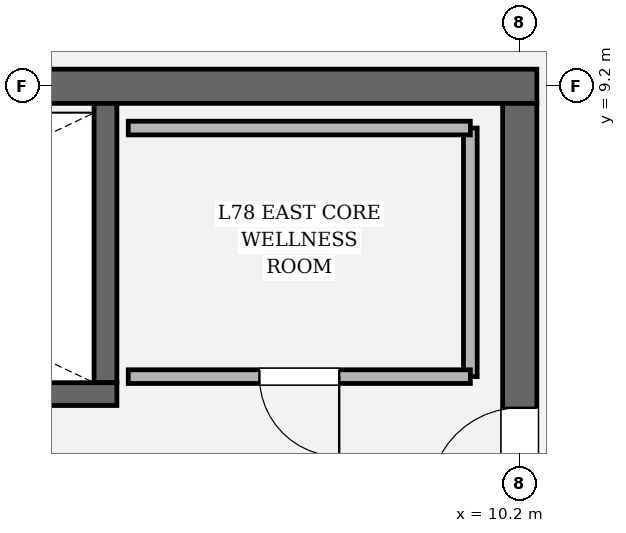
"""IFC4 building model, lengths in metres.
Left out: names, types, materials, properties, quantities, classifications, styles, units other than length and angle.
Written with IfcOpenShell. Run it as: python <this file> out.ifc"""

import sys

from ifc_helpers import new_model, si_unit, direction, frame, frame_2d, origin, place, context, subcontext, project, spatial, rectangle, extrude, element, fill, save


model = new_model("IFC4")
c1 = context("Model", 3, precision=1e-05, world=origin(), true_north=direction((0.0, 1.0)))
c2 = subcontext(c1, "Body", "Model", "MODEL_VIEW")
j1 = project(units=[si_unit("LENGTHUNIT", "METRE"), si_unit("PLANEANGLEUNIT", "RADIAN")], contexts=[c1])
p1 = place(None, origin())
s1 = spatial("IfcSite", under=j1, at=p1, CompositionType="ELEMENT")
p2 = place(p1, origin())
s2 = spatial("IfcBuilding", under=s1, at=p2, CompositionType="ELEMENT")
p3 = place(p2, frame((0.0, 0.0, 330.0)))
s3 = spatial("IfcBuildingStorey", under=s2, at=p3, CompositionType="ELEMENT", Elevation=330.0)
p4 = place(p3, frame((-10.425, 9.2, 0.0), z_axis=(0.0, 0.0, 1.0), x_axis=(1.0, 0.0, 0.0)))
e1 = element("IfcWall", 1, at=p4, inside=s3, PredefinedType="SHEAR", context=c2, shape_type="SweptSolid", body=[
    extrude(rectangle(XDim=20.85, YDim=0.45, at=frame_2d((10.425, 0.0))), origin(), (0.0, 0.0, 1.0), 4.2),
])
p5 = place(p3, frame((10.2, 8.975, 0.0), z_axis=(0.0, 0.0, 1.0), x_axis=(0.0, -1.0, 0.0)))
e2 = element("IfcWall", 2, at=p5, inside=s3, PredefinedType="SHEAR", context=c2, shape_type="SweptSolid", body=[
    extrude(rectangle(XDim=17.95, YDim=0.45, at=frame_2d((8.975, 0.0))), origin(), (0.0, 0.0, 1.0), 4.2),
])
p6 = place(p5, frame((4.005, 0.0, 0.0)))
e3 = element("IfcOpeningElement", 3, at=p6, cuts=e2, PredefinedType="OPENING", context=c2, shape_type="SweptSolid", body=[
    extrude(rectangle(XDim=1.18, YDim=2.2, at=frame_2d((0.59, 1.1))), frame((0.0, 0.235, 0.0), z_axis=(0.0, -1.0, 0.0), x_axis=(1.0, 0.0, 0.0)), (0.0, 0.0, 1.0), 0.47),
])
p7 = place(p3, frame((4.75, 8.975, 0.0), z_axis=(0.0, 0.0, 1.0), x_axis=(0.0, -1.0, 0.0)))
e4 = element("IfcWall", 4, at=p7, inside=s3, PredefinedType="SOLIDWALL", context=c2, shape_type="SweptSolid", body=[
    extrude(rectangle(XDim=3.675, YDim=0.3, at=frame_2d((1.837, 0.0))), origin(), (0.0, 0.0, 1.0), 4.2),
])
p8 = place(p3, frame((-4.9, 5.15, 0.0), z_axis=(0.0, 0.0, 1.0), x_axis=(1.0, 0.0, 0.0)))
e5 = element("IfcWall", 5, at=p8, inside=s3, PredefinedType="SOLIDWALL", context=c2, shape_type="SweptSolid", body=[
    extrude(rectangle(XDim=9.8, YDim=0.3, at=frame_2d((4.9, 0.0))), origin(), (0.0, 0.0, 1.0), 4.2),
])
p9 = place(p8, frame((0.56, 0.0, 0.0)))
e6 = element("IfcOpeningElement", 6, at=p9, cuts=e5, PredefinedType="OPENING", context=c2, shape_type="SweptSolid", body=[
    extrude(rectangle(XDim=1.18, YDim=2.2, at=frame_2d((0.59, 1.1))), frame((0.0, 0.16, 0.0), z_axis=(0.0, -1.0, 0.0), x_axis=(1.0, 0.0, 0.0)), (0.0, 0.0, 1.0), 0.32),
])
p10 = place(p3, frame((9.55, 5.38, 0.0), z_axis=(0.0, 0.0, 1.0), x_axis=(0.0, 1.0, 0.0)))
e7 = element("IfcWall", 7, at=p10, inside=s3, PredefinedType="PARTITIONING", context=c2, shape_type="SweptSolid", body=[
    extrude(rectangle(XDim=3.27, YDim=0.18, at=frame_2d((1.635, 0.0))), origin(), (0.0, 0.0, 1.0), 3.94),
])
p11 = place(p3, frame((9.55, 8.65, 0.0), z_axis=(0.0, 0.0, 1.0), x_axis=(-1.0, 0.0, 0.0)))
e8 = element("IfcWall", 8, at=p11, inside=s3, PredefinedType="PARTITIONING", context=c2, shape_type="SweptSolid", body=[
    extrude(rectangle(XDim=4.5, YDim=0.18, at=frame_2d((2.25, 0.0))), origin(), (0.0, 0.0, 1.0), 3.94),
])
p12 = place(p3, frame((5.05, 5.38, 0.0), z_axis=(0.0, 0.0, 1.0), x_axis=(1.0, 0.0, 0.0)))
e9 = element("IfcWall", 9, at=p12, inside=s3, PredefinedType="PARTITIONING", context=c2, shape_type="SweptSolid", body=[
    extrude(rectangle(XDim=4.5, YDim=0.18, at=frame_2d((2.25, 0.0))), origin(), (0.0, 0.0, 1.0), 3.94),
])
p13 = place(p12, frame((1.725, 0.0, 0.0)))
e10 = element("IfcOpeningElement", 10, at=p13, cuts=e9, PredefinedType="OPENING", context=c2, shape_type="SweptSolid", body=[
    extrude(rectangle(XDim=1.05, YDim=2.2, at=frame_2d((0.525, 1.1))), frame((0.0, 0.1, 0.0), z_axis=(0.0, -1.0, 0.0), x_axis=(1.0, 0.0, 0.0)), (0.0, 0.0, 1.0), 0.2),
])
p14 = place(p6, origin())
e11 = element("IfcDoor", 11, at=p14, inside=s3, OperationType="SINGLE_SWING_RIGHT", PredefinedType="DOOR", context=c2, shape_type="SweptSolid", body=[
    extrude(rectangle(XDim=1.18, YDim=2.2, at=frame_2d((0.59, 1.1))), frame((0.0, 0.025, 0.0), z_axis=(0.0, -1.0, 0.0), x_axis=(1.0, 0.0, 0.0)), (0.0, 0.0, 1.0), 0.05),
])
fill(e3, e11)
p15 = place(p13, origin())
e12 = element("IfcDoor", 12, at=p15, inside=s3, OperationType="SINGLE_SWING_RIGHT", PredefinedType="DOOR", context=c2, shape_type="SweptSolid", body=[
    extrude(rectangle(XDim=1.05, YDim=2.2, at=frame_2d((0.525, 1.1))), frame((0.0, 0.025, 0.0), z_axis=(0.0, -1.0, 0.0), x_axis=(1.0, 0.0, 0.0)), (0.0, 0.0, 1.0), 0.05),
])
fill(e10, e12)
save(model, sys.argv[1])
